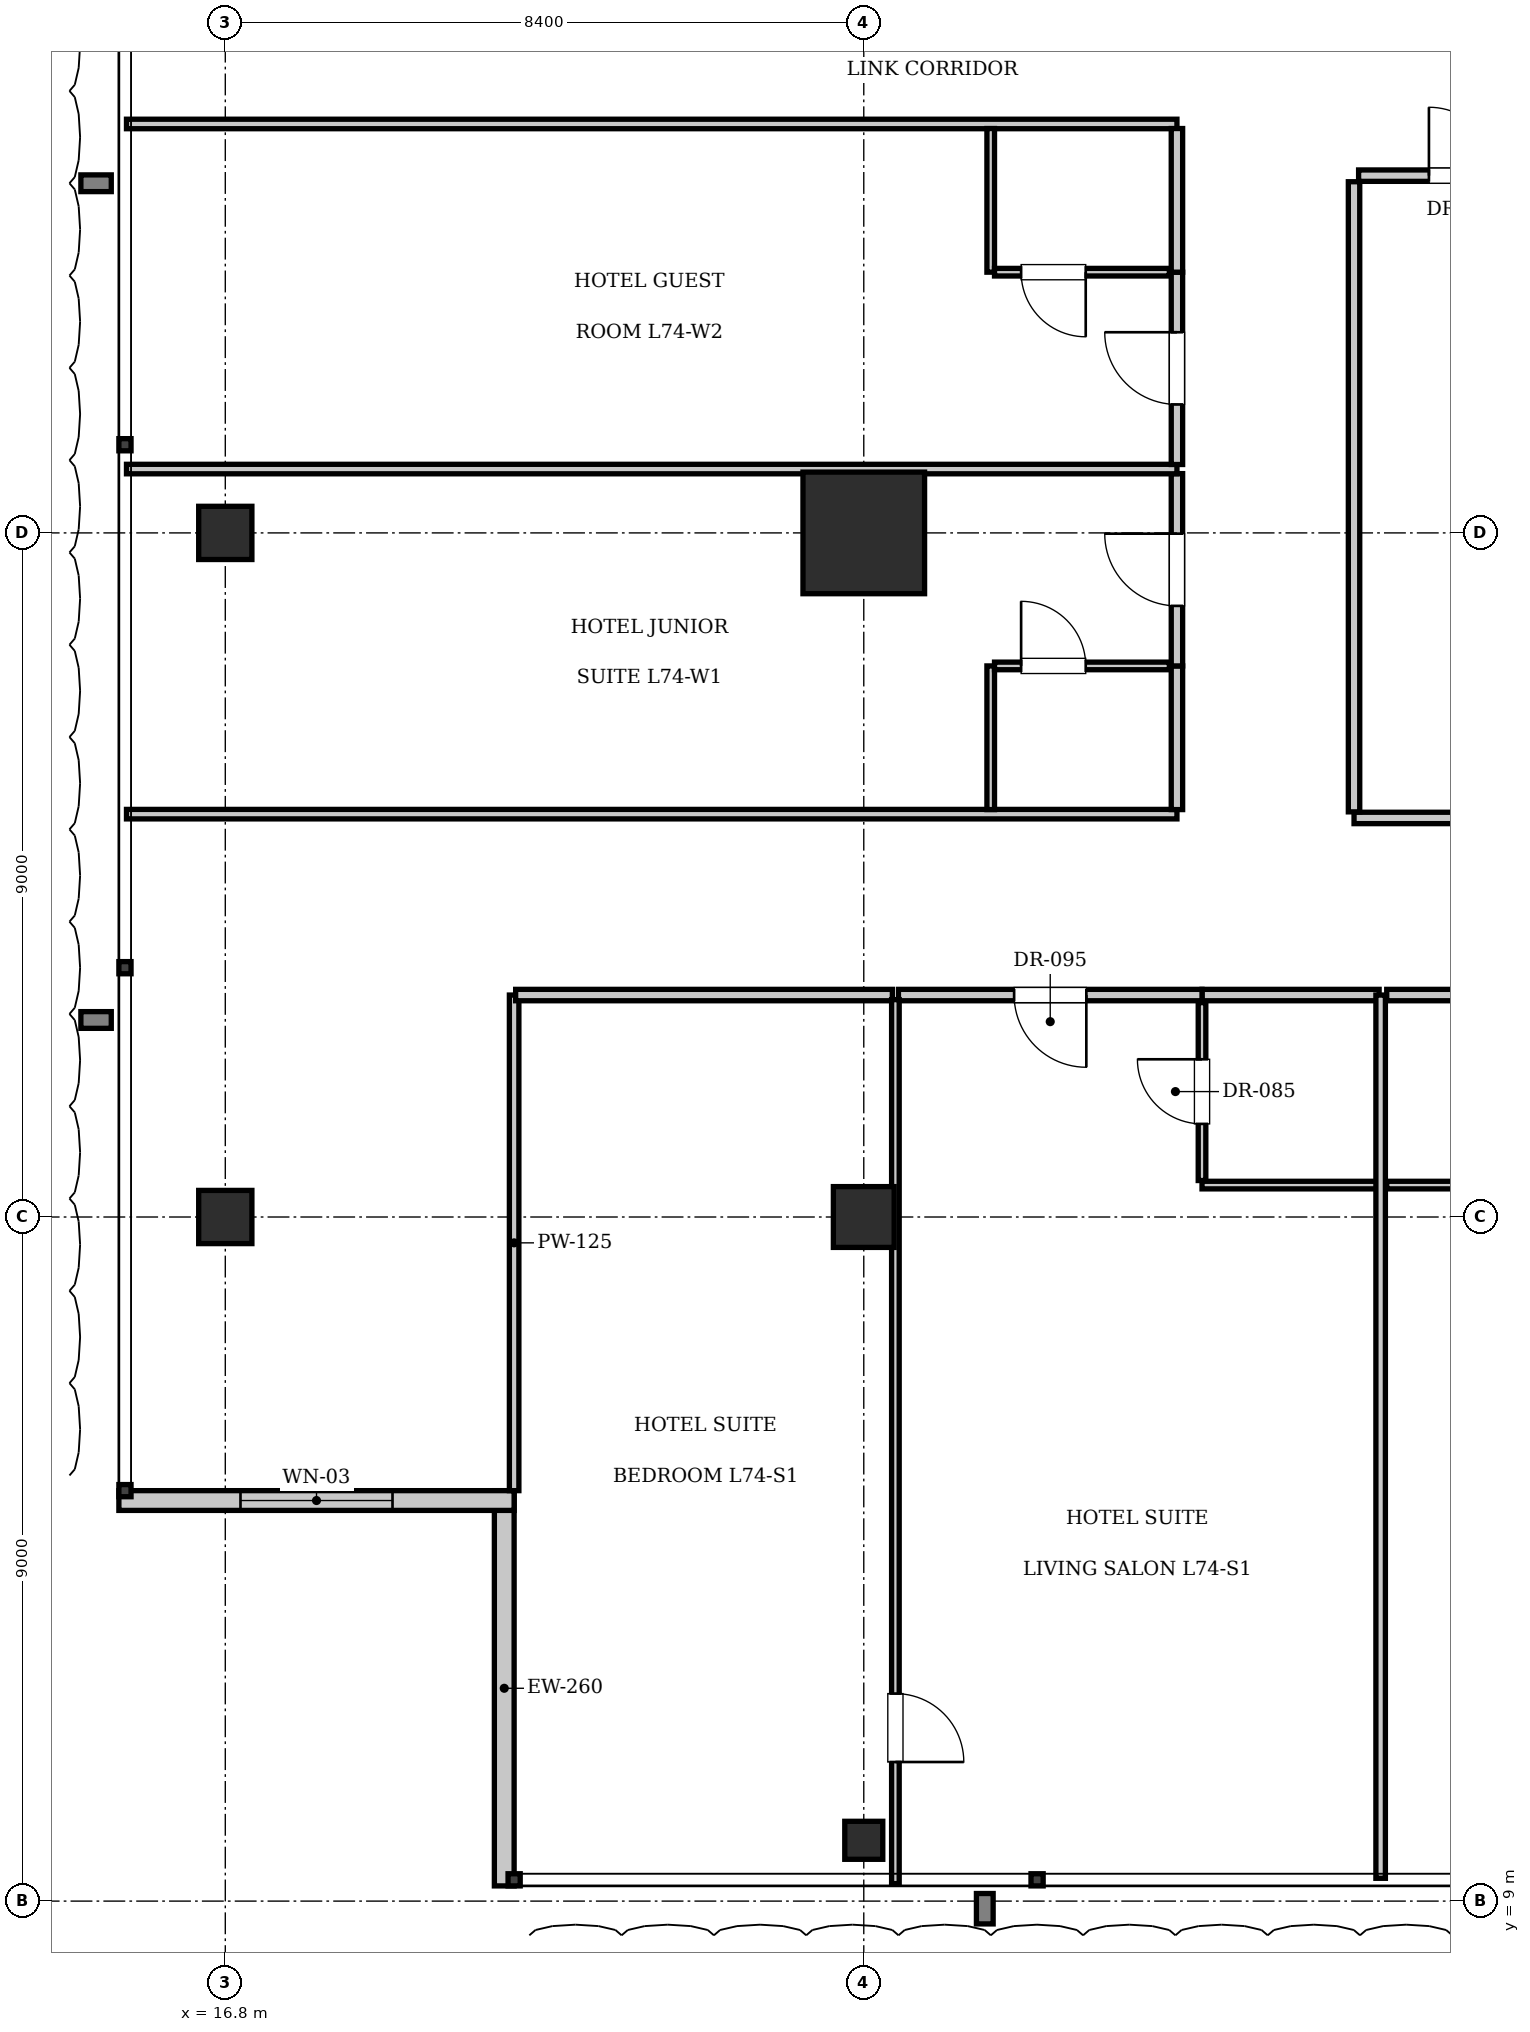
"""IFC4 building model, lengths in metres.
Left out: names, types, materials, properties, quantities, classifications, styles, units other than length and angle.
Written with IfcOpenShell. Run it as: python <this file> out.ifc"""

import sys

from ifc_helpers import new_model, si_unit, direction, frame, frame_2d, origin, origin_2d, place, context, subcontext, project, spatial, rectangle, i_section, extrude, element, fill, save


model = new_model("IFC4")
c1 = context("Model", 3, precision=1e-05, world=origin(), true_north=direction((0.0, 1.0)))
c2 = subcontext(c1, "Body", "Model", "MODEL_VIEW")
j1 = project(units=[si_unit("LENGTHUNIT", "METRE"), si_unit("PLANEANGLEUNIT", "RADIAN")], contexts=[c1])
p1 = place(None, origin())
s1 = spatial("IfcSite", under=j1, at=p1, CompositionType="ELEMENT")
p2 = place(p1, origin())
s2 = spatial("IfcBuilding", under=s1, at=p2, CompositionType="ELEMENT")
p3 = place(p2, frame((0.0, 0.0, 301.0)))
s3 = spatial("IfcBuildingStorey", under=s2, at=p3, CompositionType="ELEMENT", Elevation=301.0)
p4 = place(p3, frame((25.2, 27.0, 0.0), z_axis=(0.0, 0.0, 1.0), x_axis=(1.0, 0.0, 0.0)))
e1 = element("IfcColumn", 1, at=p4, inside=s3, PredefinedType="COLUMN", context=c2, shape_type="SweptSolid", body=[
    extrude(rectangle(XDim=1.6, YDim=1.6, at=origin_2d()), origin(), (0.0, 0.0, 1.0), 3.85),
])
p5 = place(p3, frame((25.2, 18.0, 0.0), z_axis=(0.0, 0.0, 1.0), x_axis=(1.0, 0.0, 0.0)))
e2 = element("IfcColumn", 2, at=p5, inside=s3, PredefinedType="COLUMN", context=c2, shape_type="SweptSolid", body=[
    extrude(rectangle(XDim=0.8, YDim=0.8, at=origin_2d()), origin(), (0.0, 0.0, 1.0), 3.85),
])
for number, where, z_axis, x_axis in (
    (3, (16.8, 18.0, 0.0), (0.0, 0.0, 1.0), (1.0, 0.0, 0.0)),
    (4, (16.8, 27.0, 0.0), (0.0, 0.0, 1.0), (1.0, 0.0, 0.0)),
):
    element("IfcColumn", number, at=place(p3, frame(where, z_axis=z_axis, x_axis=x_axis)), inside=s3, PredefinedType="COLUMN", context=c2, shape_type="SweptSolid", body=[
        extrude(rectangle(XDim=0.7, YDim=0.7, at=origin_2d()), origin(), (0.0, 0.0, 1.0), 3.85),
    ])
p6 = place(p3, frame((25.2, 9.8, 0.0), z_axis=(0.0, 0.0, 1.0), x_axis=(1.0, 0.0, 0.0)))
e5 = element("IfcColumn", 5, at=p6, inside=s3, PredefinedType="COLUMN", context=c2, shape_type="SweptSolid", body=[
    extrude(i_section(OverallWidth=0.5, OverallDepth=0.5, WebThickness=0.022, FlangeThickness=0.032, at=origin_2d()), origin(), (0.0, 0.0, 1.0), 3.85),
])
p7 = place(p3, frame((20.47, 9.2, 0.0), z_axis=(0.0, 0.0, 1.0), x_axis=(0.0, 1.0, 0.0)))
e6 = element("IfcWall", 6, at=p7, inside=s3, PredefinedType="SOLIDWALL", context=c2, shape_type="SweptSolid", body=[
    extrude(rectangle(XDim=5.2, YDim=0.26, at=frame_2d((2.6, 0.0))), origin(), (0.0, 0.0, 1.0), 3.61),
])
p8 = place(p3, frame((20.6, 14.27, 0.0), z_axis=(0.0, 0.0, 1.0), x_axis=(-1.0, 0.0, 0.0)))
e7 = element("IfcWall", 7, at=p8, inside=s3, PredefinedType="SOLIDWALL", context=c2, shape_type="SweptSolid", body=[
    extrude(rectangle(XDim=5.2, YDim=0.26, at=frame_2d((2.6, 0.0))), origin(), (0.0, 0.0, 1.0), 3.61),
])
p9 = place(p8, frame((1.6, 0.0, 0.9)))
e8 = element("IfcOpeningElement", 8, at=p9, cuts=e7, PredefinedType="OPENING", context=c2, shape_type="SweptSolid", body=[
    extrude(rectangle(XDim=2.0, YDim=2.2, at=frame_2d((1.0, 1.1))), frame((0.0, 0.14, 0.0), z_axis=(0.0, -1.0, 0.0), x_axis=(1.0, 0.0, 0.0)), (0.0, 0.0, 1.0), 0.28),
])
p10 = place(p3, frame((31.65, 23.25, 0.0), z_axis=(0.0, 0.0, 1.0), x_axis=(1.0, 0.0, 0.0)))
e9 = element("IfcWall", 9, at=p10, inside=s3, PredefinedType="PARTITIONING", context=c2, shape_type="SweptSolid", body=[
    extrude(rectangle(XDim=12.35, YDim=0.15, at=frame_2d((6.175, 0.0))), origin(), (0.0, 0.0, 1.0), 3.61),
])
p11 = place(p3, frame((31.65, 23.33, 0.0), z_axis=(0.0, 0.0, 1.0), x_axis=(0.0, 1.0, 0.0)))
e10 = element("IfcWall", 10, at=p11, inside=s3, PredefinedType="PARTITIONING", context=c2, shape_type="SweptSolid", body=[
    extrude(rectangle(XDim=8.29, YDim=0.15, at=frame_2d((4.145, 0.0))), origin(), (0.0, 0.0, 1.0), 3.61),
])
p12 = place(p3, frame((31.71, 31.7, 0.0), z_axis=(0.0, 0.0, 1.0), x_axis=(1.0, 0.0, 0.0)))
e11 = element("IfcWall", 11, at=p12, inside=s3, PredefinedType="PARTITIONING", context=c2, shape_type="SweptSolid", body=[
    extrude(rectangle(XDim=2.75, YDim=0.15, at=frame_2d((1.375, 0.0))), origin(), (0.0, 0.0, 1.0), 3.61),
])
p13 = place(p12, frame((0.925, 0.0, 0.0)))
e12 = element("IfcOpeningElement", 12, at=p13, cuts=e11, PredefinedType="OPENING", context=c2, shape_type="SweptSolid", body=[
    extrude(rectangle(XDim=0.9, YDim=2.1, at=frame_2d((0.45, 1.05))), frame((0.0, 0.085, 0.0), z_axis=(0.0, -1.0, 0.0), x_axis=(1.0, 0.0, 0.0)), (0.0, 0.0, 1.0), 0.17),
])
p14 = place(p3, frame((20.6, 14.4, 0.0), z_axis=(0.0, 0.0, 1.0), x_axis=(0.0, 1.0, 0.0)))
e13 = element("IfcWall", 13, at=p14, inside=s3, PredefinedType="PARTITIONING", context=c2, shape_type="SweptSolid", body=[
    extrude(rectangle(XDim=6.52, YDim=0.125, at=frame_2d((3.26, 0.0))), origin(), (0.0, 0.0, 1.0), 3.61),
])
p15 = place(p3, frame((29.65, 20.92, 0.0), z_axis=(0.0, 0.0, 1.0), x_axis=(1.0, 0.0, 0.0)))
e14 = element("IfcWall", 14, at=p15, inside=s3, PredefinedType="PARTITIONING", context=c2, shape_type="SweptSolid", body=[
    extrude(rectangle(XDim=2.33, YDim=0.15, at=frame_2d((1.165, 0.0))), origin(), (0.0, 0.0, 1.0), 3.61),
])
p16 = place(p3, frame((29.65, 18.42, 0.0), z_axis=(0.0, 0.0, 1.0), x_axis=(1.0, 0.0, 0.0)))
e15 = element("IfcWall", 15, at=p16, inside=s3, PredefinedType="PARTITIONING", context=c2, shape_type="SweptSolid", body=[
    extrude(rectangle(XDim=2.31, YDim=0.1, at=frame_2d((1.155, 0.0))), origin(), (0.0, 0.0, 1.0), 3.61),
])
p17 = place(p3, frame((29.65, 18.48, 0.0), z_axis=(0.0, 0.0, 1.0), x_axis=(0.0, 1.0, 0.0)))
e16 = element("IfcWall", 16, at=p17, inside=s3, PredefinedType="PARTITIONING", context=c2, shape_type="SweptSolid", body=[
    extrude(rectangle(XDim=2.34, YDim=0.1, at=frame_2d((1.17, 0.0))), origin(), (0.0, 0.0, 1.0), 3.61),
])
p18 = place(p17, frame((0.745, 0.0, 0.0)))
e17 = element("IfcOpeningElement", 17, at=p18, cuts=e16, PredefinedType="OPENING", context=c2, shape_type="SweptSolid", body=[
    extrude(rectangle(XDim=0.85, YDim=2.1, at=frame_2d((0.425, 1.05))), frame((0.0, 0.06, 0.0), z_axis=(0.0, -1.0, 0.0), x_axis=(1.0, 0.0, 0.0)), (0.0, 0.0, 1.0), 0.12),
])
p19 = place(p3, frame((20.62, 20.92, 0.0), z_axis=(0.0, 0.0, 1.0), x_axis=(1.0, 0.0, 0.0)))
e18 = element("IfcWall", 18, at=p19, inside=s3, PredefinedType="PARTITIONING", context=c2, shape_type="SweptSolid", body=[
    extrude(rectangle(XDim=4.956, YDim=0.15, at=frame_2d((2.478, 0.0))), origin(), (0.0, 0.0, 1.0), 3.61),
])
p20 = place(p3, frame((25.656, 20.92, 0.0), z_axis=(0.0, 0.0, 1.0), x_axis=(1.0, 0.0, 0.0)))
e19 = element("IfcWall", 19, at=p20, inside=s3, PredefinedType="PARTITIONING", context=c2, shape_type="SweptSolid", body=[
    extrude(rectangle(XDim=3.994, YDim=0.15, at=frame_2d((1.997, 0.0))), origin(), (0.0, 0.0, 1.0), 3.61),
])
p21 = place(p20, frame((1.522, 0.0, 0.0)))
e20 = element("IfcOpeningElement", 20, at=p21, cuts=e19, PredefinedType="OPENING", context=c2, shape_type="SweptSolid", body=[
    extrude(rectangle(XDim=0.95, YDim=2.15, at=frame_2d((0.475, 1.075))), frame((0.0, 0.085, 0.0), z_axis=(0.0, -1.0, 0.0), x_axis=(1.0, 0.0, 0.0)), (0.0, 0.0, 1.0), 0.17),
])
p22 = place(p3, frame((25.616, 9.23, 0.0), z_axis=(0.0, 0.0, 1.0), x_axis=(0.0, 1.0, 0.0)))
e21 = element("IfcWall", 21, at=p22, inside=s3, PredefinedType="PARTITIONING", context=c2, shape_type="SweptSolid", body=[
    extrude(rectangle(XDim=11.63, YDim=0.1, at=frame_2d((5.815, 0.0))), origin(), (0.0, 0.0, 1.0), 3.61),
])
p23 = place(p22, frame((1.6, 0.0, 0.0)))
e22 = element("IfcOpeningElement", 22, at=p23, cuts=e21, PredefinedType="OPENING", context=c2, shape_type="SweptSolid", body=[
    extrude(rectangle(XDim=0.9, YDim=2.1, at=frame_2d((0.45, 1.05))), frame((0.0, 0.06, 0.0), z_axis=(0.0, -1.0, 0.0), x_axis=(1.0, 0.0, 0.0)), (0.0, 0.0, 1.0), 0.12),
])
p24 = place(p3, frame((32.0, 9.3, 0.0), z_axis=(0.0, 0.0, 1.0), x_axis=(0.0, 1.0, 0.0)))
e23 = element("IfcWall", 23, at=p24, inside=s3, PredefinedType="PARTITIONING", context=c2, shape_type="SweptSolid", body=[
    extrude(rectangle(XDim=11.62, YDim=0.125, at=frame_2d((5.81, 0.0))), origin(), (0.0, 0.0, 1.0), 3.61),
])
p25 = place(p3, frame((32.08, 20.92, 0.0), z_axis=(0.0, 0.0, 1.0), x_axis=(1.0, 0.0, 0.0)))
e24 = element("IfcWall", 24, at=p25, inside=s3, PredefinedType="PARTITIONING", context=c2, shape_type="SweptSolid", body=[
    extrude(rectangle(XDim=2.27, YDim=0.15, at=frame_2d((1.135, 0.0))), origin(), (0.0, 0.0, 1.0), 3.61),
])
p26 = place(p3, frame((32.08, 18.42, 0.0), z_axis=(0.0, 0.0, 1.0), x_axis=(1.0, 0.0, 0.0)))
e25 = element("IfcWall", 25, at=p26, inside=s3, PredefinedType="PARTITIONING", context=c2, shape_type="SweptSolid", body=[
    extrude(rectangle(XDim=2.27, YDim=0.1, at=frame_2d((1.135, 0.0))), origin(), (0.0, 0.0, 1.0), 3.61),
])
for number, where, z_axis, x_axis in (
    (26, (15.5, 23.3, 0.0), (0.0, 0.0, 1.0), (1.0, 0.0, 0.0)),
    (27, (15.5, 32.38, 0.0), (0.0, 0.0, 1.0), (1.0, 0.0, 0.0)),
):
    element("IfcWall", number, at=place(p3, frame(where, z_axis=z_axis, x_axis=x_axis)), inside=s3, PredefinedType="PARTITIONING", context=c2, shape_type="SweptSolid", body=[
        extrude(rectangle(XDim=13.82, YDim=0.125, at=frame_2d((6.91, 0.0))), origin(), (0.0, 0.0, 1.0), 3.61),
    ])
p27 = place(p3, frame((29.32, 23.36, 0.0), z_axis=(0.0, 0.0, 1.0), x_axis=(0.0, 1.0, 0.0)))
e28 = element("IfcWall", 28, at=p27, inside=s3, PredefinedType="PARTITIONING", context=c2, shape_type="SweptSolid", body=[
    extrude(rectangle(XDim=1.89, YDim=0.15, at=frame_2d((0.945, 0.0))), origin(), (0.0, 0.0, 1.0), 3.61),
])
p28 = place(p3, frame((29.32, 25.25, 0.0), z_axis=(0.0, 0.0, 1.0), x_axis=(0.0, 1.0, 0.0)))
e29 = element("IfcWall", 29, at=p28, inside=s3, PredefinedType="PARTITIONING", context=c2, shape_type="SweptSolid", body=[
    extrude(rectangle(XDim=2.53, YDim=0.15, at=frame_2d((1.265, 0.0))), origin(), (0.0, 0.0, 1.0), 3.61),
])
p29 = place(p28, frame((0.79, 0.0, 0.0)))
e30 = element("IfcOpeningElement", 30, at=p29, cuts=e29, PredefinedType="OPENING", context=c2, shape_type="SweptSolid", body=[
    extrude(rectangle(XDim=0.95, YDim=2.15, at=frame_2d((0.475, 1.075))), frame((0.0, 0.085, 0.0), z_axis=(0.0, -1.0, 0.0), x_axis=(1.0, 0.0, 0.0)), (0.0, 0.0, 1.0), 0.17),
])
p30 = place(p3, frame((26.87, 23.36, 0.0), z_axis=(0.0, 0.0, 1.0), x_axis=(0.0, 1.0, 0.0)))
e31 = element("IfcWall", 31, at=p30, inside=s3, PredefinedType="PARTITIONING", context=c2, shape_type="SweptSolid", body=[
    extrude(rectangle(XDim=1.89, YDim=0.1, at=frame_2d((0.945, 0.0))), origin(), (0.0, 0.0, 1.0), 3.61),
])
p31 = place(p3, frame((26.92, 25.25, 0.0), z_axis=(0.0, 0.0, 1.0), x_axis=(1.0, 0.0, 0.0)))
e32 = element("IfcWall", 32, at=p31, inside=s3, PredefinedType="PARTITIONING", context=c2, shape_type="SweptSolid", body=[
    extrude(rectangle(XDim=2.3, YDim=0.1, at=frame_2d((1.15, 0.0))), origin(), (0.0, 0.0, 1.0), 3.61),
])
p32 = place(p31, frame((0.35, 0.0, 0.0)))
e33 = element("IfcOpeningElement", 33, at=p32, cuts=e32, PredefinedType="OPENING", context=c2, shape_type="SweptSolid", body=[
    extrude(rectangle(XDim=0.85, YDim=2.1, at=frame_2d((0.425, 1.05))), frame((0.0, 0.06, 0.0), z_axis=(0.0, -1.0, 0.0), x_axis=(1.0, 0.0, 0.0)), (0.0, 0.0, 1.0), 0.12),
])
p33 = place(p3, frame((15.5, 27.84, 0.0), z_axis=(0.0, 0.0, 1.0), x_axis=(1.0, 0.0, 0.0)))
e34 = element("IfcWall", 34, at=p33, inside=s3, PredefinedType="PARTITIONING", context=c2, shape_type="SweptSolid", body=[
    extrude(rectangle(XDim=13.82, YDim=0.125, at=frame_2d((6.91, 0.0))), origin(), (0.0, 0.0, 1.0), 3.61),
])
p34 = place(p3, frame((29.32, 27.9, 0.0), z_axis=(0.0, 0.0, 1.0), x_axis=(0.0, 1.0, 0.0)))
e35 = element("IfcWall", 35, at=p34, inside=s3, PredefinedType="PARTITIONING", context=c2, shape_type="SweptSolid", body=[
    extrude(rectangle(XDim=2.53, YDim=0.15, at=frame_2d((1.265, 0.0))), origin(), (0.0, 0.0, 1.0), 3.61),
])
p35 = place(p34, frame((0.79, 0.0, 0.0)))
e36 = element("IfcOpeningElement", 36, at=p35, cuts=e35, PredefinedType="OPENING", context=c2, shape_type="SweptSolid", body=[
    extrude(rectangle(XDim=0.95, YDim=2.15, at=frame_2d((0.475, 1.075))), frame((0.0, 0.085, 0.0), z_axis=(0.0, -1.0, 0.0), x_axis=(1.0, 0.0, 0.0)), (0.0, 0.0, 1.0), 0.17),
])
p36 = place(p3, frame((29.32, 30.43, 0.0), z_axis=(0.0, 0.0, 1.0), x_axis=(0.0, 1.0, 0.0)))
e37 = element("IfcWall", 37, at=p36, inside=s3, PredefinedType="PARTITIONING", context=c2, shape_type="SweptSolid", body=[
    extrude(rectangle(XDim=1.89, YDim=0.15, at=frame_2d((0.945, 0.0))), origin(), (0.0, 0.0, 1.0), 3.61),
])
p37 = place(p3, frame((26.87, 30.43, 0.0), z_axis=(0.0, 0.0, 1.0), x_axis=(0.0, 1.0, 0.0)))
e38 = element("IfcWall", 38, at=p37, inside=s3, PredefinedType="PARTITIONING", context=c2, shape_type="SweptSolid", body=[
    extrude(rectangle(XDim=1.89, YDim=0.1, at=frame_2d((0.945, 0.0))), origin(), (0.0, 0.0, 1.0), 3.61),
])
p38 = place(p3, frame((26.92, 30.43, 0.0), z_axis=(0.0, 0.0, 1.0), x_axis=(1.0, 0.0, 0.0)))
e39 = element("IfcWall", 39, at=p38, inside=s3, PredefinedType="PARTITIONING", context=c2, shape_type="SweptSolid", body=[
    extrude(rectangle(XDim=2.3, YDim=0.1, at=frame_2d((1.15, 0.0))), origin(), (0.0, 0.0, 1.0), 3.61),
])
p39 = place(p38, frame((0.35, 0.0, 0.0)))
e40 = element("IfcOpeningElement", 40, at=p39, cuts=e39, PredefinedType="OPENING", context=c2, shape_type="SweptSolid", body=[
    extrude(rectangle(XDim=0.85, YDim=2.1, at=frame_2d((0.425, 1.05))), frame((0.0, 0.06, 0.0), z_axis=(0.0, -1.0, 0.0), x_axis=(1.0, 0.0, 0.0)), (0.0, 0.0, 1.0), 0.12),
])
p40 = place(p9, origin())
e41 = element("IfcWindow", 41, at=p40, inside=s3, PartitioningType="SINGLE_PANEL", PredefinedType="WINDOW", context=c2, shape_type="SweptSolid", body=[
    extrude(rectangle(XDim=2.0, YDim=2.2, at=frame_2d((1.0, 1.1))), frame((0.0, 0.03, 0.0), z_axis=(0.0, -1.0, 0.0), x_axis=(1.0, 0.0, 0.0)), (0.0, 0.0, 1.0), 0.06),
])
fill(e8, e41)
p41 = place(p13, origin())
e42 = element("IfcDoor", 42, at=p41, inside=s3, OperationType="SINGLE_SWING_LEFT", PredefinedType="DOOR", context=c2, shape_type="SweptSolid", body=[
    extrude(rectangle(XDim=0.9, YDim=2.1, at=frame_2d((0.45, 1.05))), frame((0.0, 0.025, 0.0), z_axis=(0.0, -1.0, 0.0), x_axis=(1.0, 0.0, 0.0)), (0.0, 0.0, 1.0), 0.05),
])
fill(e12, e42)
p42 = place(p18, origin())
e43 = element("IfcDoor", 43, at=p42, inside=s3, OperationType="SINGLE_SWING_RIGHT", PredefinedType="DOOR", context=c2, shape_type="SweptSolid", body=[
    extrude(rectangle(XDim=0.85, YDim=2.1, at=frame_2d((0.425, 1.05))), frame((0.0, 0.025, 0.0), z_axis=(0.0, -1.0, 0.0), x_axis=(1.0, 0.0, 0.0)), (0.0, 0.0, 1.0), 0.05),
])
fill(e17, e43)
p43 = place(p21, frame((0.95, 0.0, 0.0), z_axis=(0.0, 0.0, 1.0), x_axis=(-1.0, 0.0, 0.0)))
e44 = element("IfcDoor", 44, at=p43, inside=s3, OperationType="SINGLE_SWING_LEFT", PredefinedType="DOOR", context=c2, shape_type="SweptSolid", body=[
    extrude(rectangle(XDim=0.95, YDim=2.15, at=frame_2d((0.475, 1.075))), frame((0.0, 0.025, 0.0), z_axis=(0.0, -1.0, 0.0), x_axis=(1.0, 0.0, 0.0)), (0.0, 0.0, 1.0), 0.05),
])
fill(e20, e44)
p44 = place(p23, frame((0.9, 0.0, 0.0), z_axis=(0.0, 0.0, 1.0), x_axis=(-1.0, 0.0, 0.0)))
e45 = element("IfcDoor", 45, at=p44, inside=s3, OperationType="SINGLE_SWING_RIGHT", PredefinedType="DOOR", context=c2, shape_type="SweptSolid", body=[
    extrude(rectangle(XDim=0.9, YDim=2.1, at=frame_2d((0.45, 1.05))), frame((0.0, 0.025, 0.0), z_axis=(0.0, -1.0, 0.0), x_axis=(1.0, 0.0, 0.0)), (0.0, 0.0, 1.0), 0.05),
])
fill(e22, e45)
p45 = place(p32, origin())
e46 = element("IfcDoor", 46, at=p45, inside=s3, OperationType="SINGLE_SWING_LEFT", PredefinedType="DOOR", context=c2, shape_type="SweptSolid", body=[
    extrude(rectangle(XDim=0.85, YDim=2.1, at=frame_2d((0.425, 1.05))), frame((0.0, 0.025, 0.0), z_axis=(0.0, -1.0, 0.0), x_axis=(1.0, 0.0, 0.0)), (0.0, 0.0, 1.0), 0.05),
])
fill(e33, e46)
p46 = place(p29, origin())
e47 = element("IfcDoor", 47, at=p46, inside=s3, OperationType="SINGLE_SWING_RIGHT", PredefinedType="DOOR", context=c2, shape_type="SweptSolid", body=[
    extrude(rectangle(XDim=0.95, YDim=2.15, at=frame_2d((0.475, 1.075))), frame((0.0, 0.025, 0.0), z_axis=(0.0, -1.0, 0.0), x_axis=(1.0, 0.0, 0.0)), (0.0, 0.0, 1.0), 0.05),
])
fill(e30, e47)
p47 = place(p39, frame((0.85, 0.0, 0.0), z_axis=(0.0, 0.0, 1.0), x_axis=(-1.0, 0.0, 0.0)))
e48 = element("IfcDoor", 48, at=p47, inside=s3, OperationType="SINGLE_SWING_LEFT", PredefinedType="DOOR", context=c2, shape_type="SweptSolid", body=[
    extrude(rectangle(XDim=0.85, YDim=2.1, at=frame_2d((0.425, 1.05))), frame((0.0, 0.025, 0.0), z_axis=(0.0, -1.0, 0.0), x_axis=(1.0, 0.0, 0.0)), (0.0, 0.0, 1.0), 0.05),
])
fill(e40, e48)
p48 = place(p35, origin())
e49 = element("IfcDoor", 49, at=p48, inside=s3, OperationType="SINGLE_SWING_RIGHT", PredefinedType="DOOR", context=c2, shape_type="SweptSolid", body=[
    extrude(rectangle(XDim=0.95, YDim=2.15, at=frame_2d((0.475, 1.075))), frame((0.0, 0.025, 0.0), z_axis=(0.0, -1.0, 0.0), x_axis=(1.0, 0.0, 0.0)), (0.0, 0.0, 1.0), 0.05),
])
fill(e36, e49)
save(model, sys.argv[1])
